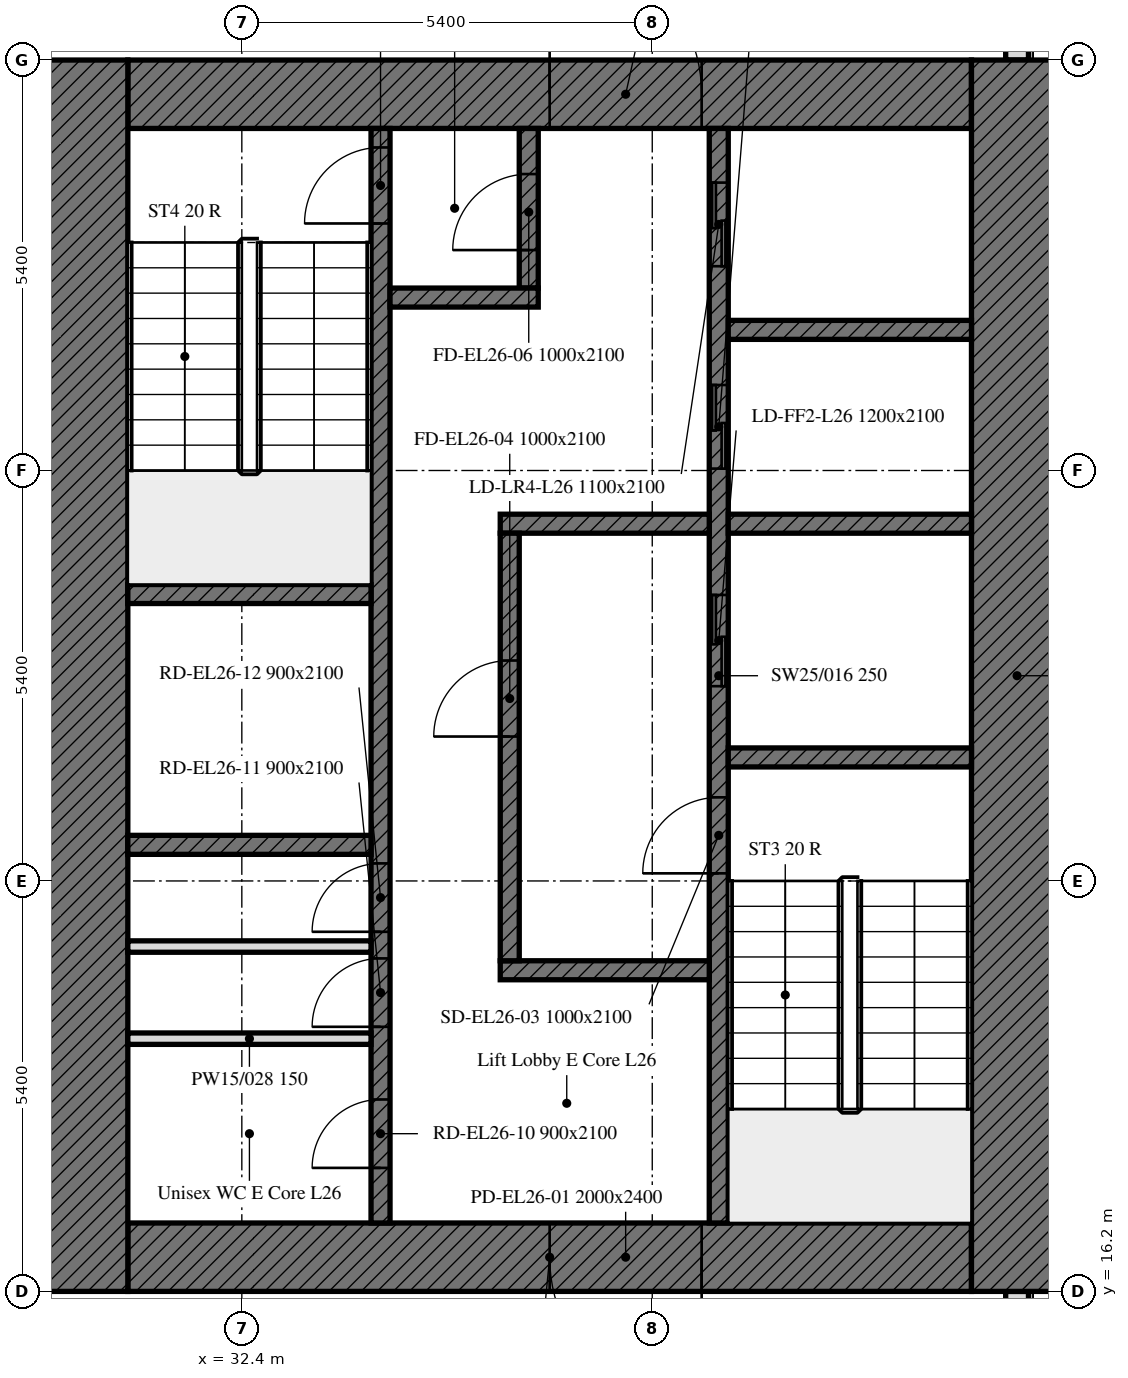
"""IFC4 building model, lengths in metres.
Left out: names, types, materials, properties, quantities, classifications, styles, units other than length and angle.
Written with IfcOpenShell. Run it as: python <this file> out.ifc"""

import sys

from ifc_helpers import new_model, si_unit, direction, frame, frame_2d, origin, place, context, subcontext, project, spatial, rectangle, extrude, element, fill, save


model = new_model("IFC4")
c1 = context("Model", 3, precision=1e-05, world=origin(), true_north=direction((0.0, 1.0)))
c2 = subcontext(c1, "Body", "Model", "MODEL_VIEW")
j1 = project(units=[si_unit("LENGTHUNIT", "METRE"), si_unit("PLANEANGLEUNIT", "RADIAN")], contexts=[c1])
p1 = place(None, origin())
s1 = spatial("IfcSite", under=j1, at=p1, CompositionType="ELEMENT")
p2 = place(p1, origin())
s2 = spatial("IfcBuilding", under=s1, at=p2, CompositionType="ELEMENT")
p3 = place(p2, frame((0.0, 0.0, 110.6)))
s3 = spatial("IfcBuildingStorey", under=s2, at=p3, CompositionType="ELEMENT", Elevation=110.6)
p4 = place(p3, frame((42.6, 10.986, 0.0), z_axis=(0.0, 0.0, 1.0), x_axis=(0.0, 1.0, 0.0)))
e1 = element("IfcWall", 1, at=p4, inside=s3, PredefinedType="SOLIDWALL", context=c2, shape_type="SweptSolid", body=[
    extrude(rectangle(XDim=5.214, YDim=0.3, at=frame_2d((2.607, 0.0))), origin(), (0.0, 0.0, 1.0), 3.5),
])
p5 = place(p4, frame((1.164, 0.0, 0.9)))
e2 = element("IfcOpeningElement", 2, at=p5, cuts=e1, PredefinedType="OPENING", context=c2, shape_type="SweptSolid", body=[
    extrude(rectangle(XDim=1.1, YDim=1.7, at=frame_2d((0.55, 0.85))), frame((0.0, 0.16, 0.0), z_axis=(0.0, -1.0, 0.0), x_axis=(1.0, 0.0, 0.0)), (0.0, 0.0, 1.0), 0.32),
])
p6 = place(p4, frame((2.764, 0.0, 0.9)))
e3 = element("IfcOpeningElement", 3, at=p6, cuts=e1, PredefinedType="OPENING", context=c2, shape_type="SweptSolid", body=[
    extrude(rectangle(XDim=1.1, YDim=1.7, at=frame_2d((0.55, 0.85))), frame((0.0, 0.16, 0.0), z_axis=(0.0, -1.0, 0.0), x_axis=(1.0, 0.0, 0.0)), (0.0, 0.0, 1.0), 0.32),
])
p7 = place(p3, frame((42.6, 32.4, 0.0), z_axis=(0.0, 0.0, 1.0), x_axis=(0.0, 1.0, 0.0)))
e4 = element("IfcWall", 4, at=p7, inside=s3, PredefinedType="SOLIDWALL", context=c2, shape_type="SweptSolid", body=[
    extrude(rectangle(XDim=10.614, YDim=0.3, at=frame_2d((5.307, 0.0))), origin(), (0.0, 0.0, 1.0), 3.5),
])
p8 = place(p7, frame((1.35, 0.0, 0.9)))
e5 = element("IfcOpeningElement", 5, at=p8, cuts=e4, PredefinedType="OPENING", context=c2, shape_type="SweptSolid", body=[
    extrude(rectangle(XDim=1.1, YDim=1.7, at=frame_2d((0.55, 0.85))), frame((0.0, 0.16, 0.0), z_axis=(0.0, -1.0, 0.0), x_axis=(1.0, 0.0, 0.0)), (0.0, 0.0, 1.0), 0.32),
])
p9 = place(p7, frame((2.95, 0.0, 0.9)))
e6 = element("IfcOpeningElement", 6, at=p9, cuts=e4, PredefinedType="OPENING", context=c2, shape_type="SweptSolid", body=[
    extrude(rectangle(XDim=1.1, YDim=1.7, at=frame_2d((0.55, 0.85))), frame((0.0, 0.16, 0.0), z_axis=(0.0, -1.0, 0.0), x_axis=(1.0, 0.0, 0.0)), (0.0, 0.0, 1.0), 0.32),
])
p10 = place(p3, frame((42.0, 16.65, 0.0), z_axis=(0.0, 0.0, 1.0), x_axis=(-1.0, 0.0, 0.0)))
e7 = element("IfcWall", 7, at=p10, inside=s3, PredefinedType="SOLIDWALL", context=c2, shape_type="SweptSolid", body=[
    extrude(rectangle(XDim=11.1, YDim=0.9, at=frame_2d((5.55, 0.0))), origin(), (0.0, 0.0, 1.0), 3.5),
])
p11 = place(p10, frame((3.55, 0.0, 0.0)))
e8 = element("IfcOpeningElement", 8, at=p11, cuts=e7, PredefinedType="OPENING", context=c2, shape_type="SweptSolid", body=[
    extrude(rectangle(XDim=2.0, YDim=2.4, at=frame_2d((1.0, 1.2))), frame((0.0, 0.45, 0.0), z_axis=(0.0, -1.0, 0.0), x_axis=(1.0, 0.0, 0.0)), (0.0, 0.0, 1.0), 0.9),
])
p12 = place(p3, frame((30.9, 31.95, 0.0), z_axis=(0.0, 0.0, 1.0), x_axis=(1.0, 0.0, 0.0)))
e9 = element("IfcWall", 9, at=p12, inside=s3, PredefinedType="SOLIDWALL", context=c2, shape_type="SweptSolid", body=[
    extrude(rectangle(XDim=11.1, YDim=0.9, at=frame_2d((5.55, 0.0))), origin(), (0.0, 0.0, 1.0), 3.5),
])
p13 = place(p12, frame((5.55, 0.0, 0.0)))
e10 = element("IfcOpeningElement", 10, at=p13, cuts=e9, PredefinedType="OPENING", context=c2, shape_type="SweptSolid", body=[
    extrude(rectangle(XDim=2.0, YDim=2.4, at=frame_2d((1.0, 1.2))), frame((0.0, 0.45, 0.0), z_axis=(0.0, -1.0, 0.0), x_axis=(1.0, 0.0, 0.0)), (0.0, 0.0, 1.0), 0.9),
])
for number, where, z_axis, x_axis in (
    (11, (42.6, 32.4, 0.0), (0.0, 0.0, 1.0), (0.0, -1.0, 0.0)),
    (12, (30.3, 16.2, 0.0), (0.0, 0.0, 1.0), (0.0, 1.0, 0.0)),
):
    element("IfcWall", number, at=place(p3, frame(where, z_axis=z_axis, x_axis=x_axis)), inside=s3, PredefinedType="SOLIDWALL", context=c2, shape_type="SweptSolid", body=[
        extrude(rectangle(XDim=16.2, YDim=1.2, at=frame_2d((8.1, 0.0))), origin(), (0.0, 0.0, 1.0), 3.5),
    ])
p14 = place(p3, frame((38.675, 17.1, 0.0), z_axis=(0.0, 0.0, 1.0), x_axis=(0.0, 1.0, 0.0)))
e13 = element("IfcWall", 13, at=p14, inside=s3, PredefinedType="SOLIDWALL", context=c2, shape_type="SweptSolid", body=[
    extrude(rectangle(XDim=14.4, YDim=0.25, at=frame_2d((7.2, 0.0))), origin(), (0.0, 0.0, 1.0), 3.5),
])
p15 = place(p14, frame((4.6, 0.0, 0.0)))
e14 = element("IfcOpeningElement", 14, at=p15, cuts=e13, PredefinedType="OPENING", context=c2, shape_type="SweptSolid", body=[
    extrude(rectangle(XDim=1.0, YDim=2.1, at=frame_2d((0.5, 1.05))), frame((0.0, 0.125, 0.0), z_axis=(0.0, -1.0, 0.0), x_axis=(1.0, 0.0, 0.0)), (0.0, 0.0, 1.0), 0.25),
])
p16 = place(p14, frame((7.062, 0.0, 0.0)))
e15 = element("IfcOpeningElement", 15, at=p16, cuts=e13, PredefinedType="OPENING", context=c2, shape_type="SweptSolid", body=[
    extrude(rectangle(XDim=1.2, YDim=2.1, at=frame_2d((0.6, 1.05))), frame((0.0, 0.125, 0.0), z_axis=(0.0, -1.0, 0.0), x_axis=(1.0, 0.0, 0.0)), (0.0, 0.0, 1.0), 0.25),
])
p17 = place(p14, frame((9.925, 0.0, 0.0)))
e16 = element("IfcOpeningElement", 16, at=p17, cuts=e13, PredefinedType="OPENING", context=c2, shape_type="SweptSolid", body=[
    extrude(rectangle(XDim=1.1, YDim=2.1, at=frame_2d((0.55, 1.05))), frame((0.0, 0.125, 0.0), z_axis=(0.0, -1.0, 0.0), x_axis=(1.0, 0.0, 0.0)), (0.0, 0.0, 1.0), 0.25),
])
p18 = place(p14, frame((12.587, 0.0, 0.0)))
e17 = element("IfcOpeningElement", 17, at=p18, cuts=e13, PredefinedType="OPENING", context=c2, shape_type="SweptSolid", body=[
    extrude(rectangle(XDim=1.1, YDim=2.1, at=frame_2d((0.55, 1.05))), frame((0.0, 0.125, 0.0), z_axis=(0.0, -1.0, 0.0), x_axis=(1.0, 0.0, 0.0)), (0.0, 0.0, 1.0), 0.25),
])
p19 = place(p3, frame((34.225, 17.1, 0.0), z_axis=(0.0, 0.0, 1.0), x_axis=(0.0, 1.0, 0.0)))
e18 = element("IfcWall", 18, at=p19, inside=s3, PredefinedType="SOLIDWALL", context=c2, shape_type="SweptSolid", body=[
    extrude(rectangle(XDim=14.4, YDim=0.25, at=frame_2d((7.2, 0.0))), origin(), (0.0, 0.0, 1.0), 3.5),
])
p20 = place(p19, frame((13.15, 0.0, 0.0)))
e19 = element("IfcOpeningElement", 19, at=p20, cuts=e18, PredefinedType="OPENING", context=c2, shape_type="SweptSolid", body=[
    extrude(rectangle(XDim=1.0, YDim=2.1, at=frame_2d((0.5, 1.05))), frame((0.0, 0.125, 0.0), z_axis=(0.0, -1.0, 0.0), x_axis=(1.0, 0.0, 0.0)), (0.0, 0.0, 1.0), 0.25),
])
p21 = place(p19, frame((0.725, 0.0, 0.0)))
e20 = element("IfcOpeningElement", 20, at=p21, cuts=e18, PredefinedType="OPENING", context=c2, shape_type="SweptSolid", body=[
    extrude(rectangle(XDim=0.9, YDim=2.1, at=frame_2d((0.45, 1.05))), frame((0.0, 0.125, 0.0), z_axis=(0.0, -1.0, 0.0), x_axis=(1.0, 0.0, 0.0)), (0.0, 0.0, 1.0), 0.25),
])
p22 = place(p19, frame((2.581, 0.0, 0.0)))
e21 = element("IfcOpeningElement", 21, at=p22, cuts=e18, PredefinedType="OPENING", context=c2, shape_type="SweptSolid", body=[
    extrude(rectangle(XDim=0.9, YDim=2.1, at=frame_2d((0.45, 1.05))), frame((0.0, 0.125, 0.0), z_axis=(0.0, -1.0, 0.0), x_axis=(1.0, 0.0, 0.0)), (0.0, 0.0, 1.0), 0.25),
])
p23 = place(p19, frame((3.831, 0.0, 0.0)))
e22 = element("IfcOpeningElement", 22, at=p23, cuts=e18, PredefinedType="OPENING", context=c2, shape_type="SweptSolid", body=[
    extrude(rectangle(XDim=0.9, YDim=2.1, at=frame_2d((0.45, 1.05))), frame((0.0, 0.125, 0.0), z_axis=(0.0, -1.0, 0.0), x_axis=(1.0, 0.0, 0.0)), (0.0, 0.0, 1.0), 0.25),
])
p24 = place(p3, frame((38.8, 23.225, 0.0), z_axis=(0.0, 0.0, 1.0), x_axis=(1.0, 0.0, 0.0)))
e23 = element("IfcWall", 23, at=p24, inside=s3, PredefinedType="SOLIDWALL", context=c2, shape_type="SweptSolid", body=[
    extrude(rectangle(XDim=3.2, YDim=0.25, at=frame_2d((1.6, 0.0))), origin(), (0.0, 0.0, 1.0), 3.5),
])
for number, where, z_axis, x_axis in (
    (24, (30.9, 25.375, 0.0), (0.0, 0.0, 1.0), (1.0, 0.0, 0.0)),
    (25, (30.9, 22.075, 0.0), (0.0, 0.0, 1.0), (1.0, 0.0, 0.0)),
):
    element("IfcWall", number, at=place(p3, frame(where, z_axis=z_axis, x_axis=x_axis)), inside=s3, PredefinedType="SOLIDWALL", context=c2, shape_type="SweptSolid", body=[
        extrude(rectangle(XDim=3.2, YDim=0.25, at=frame_2d((1.6, 0.0))), origin(), (0.0, 0.0, 1.0), 3.5),
    ])
p25 = place(p3, frame((38.8, 26.3, 0.0), z_axis=(0.0, 0.0, 1.0), x_axis=(1.0, 0.0, 0.0)))
e26 = element("IfcWall", 26, at=p25, inside=s3, PredefinedType="SOLIDWALL", context=c2, shape_type="SweptSolid", body=[
    extrude(rectangle(XDim=3.2, YDim=0.25, at=frame_2d((1.6, 0.0))), origin(), (0.0, 0.0, 1.0), 3.5),
])
for number, where, z_axis, x_axis in (
    (27, (35.8, 26.3, 0.0), (0.0, 0.0, 1.0), (1.0, 0.0, 0.0)),
    (28, (35.8, 20.425, 0.0), (0.0, 0.0, 1.0), (1.0, 0.0, 0.0)),
):
    element("IfcWall", number, at=place(p3, frame(where, z_axis=z_axis, x_axis=x_axis)), inside=s3, PredefinedType="SOLIDWALL", context=c2, shape_type="SweptSolid", body=[
        extrude(rectangle(XDim=2.75, YDim=0.25, at=frame_2d((1.375, 0.0))), origin(), (0.0, 0.0, 1.0), 3.5),
    ])
p26 = place(p3, frame((36.175, 29.4, 0.0), z_axis=(0.0, 0.0, 1.0), x_axis=(0.0, 1.0, 0.0)))
e29 = element("IfcWall", 29, at=p26, inside=s3, PredefinedType="SOLIDWALL", context=c2, shape_type="SweptSolid", body=[
    extrude(rectangle(XDim=2.1, YDim=0.25, at=frame_2d((1.05, 0.0))), origin(), (0.0, 0.0, 1.0), 3.5),
])
p27 = place(p26, frame((0.5, 0.0, 0.0)))
e30 = element("IfcOpeningElement", 30, at=p27, cuts=e29, PredefinedType="OPENING", context=c2, shape_type="SweptSolid", body=[
    extrude(rectangle(XDim=1.0, YDim=2.1, at=frame_2d((0.5, 1.05))), frame((0.0, 0.125, 0.0), z_axis=(0.0, -1.0, 0.0), x_axis=(1.0, 0.0, 0.0)), (0.0, 0.0, 1.0), 0.25),
])
p28 = place(p3, frame((34.35, 29.275, 0.0), z_axis=(0.0, 0.0, 1.0), x_axis=(1.0, 0.0, 0.0)))
e31 = element("IfcWall", 31, at=p28, inside=s3, PredefinedType="SOLIDWALL", context=c2, shape_type="SweptSolid", body=[
    extrude(rectangle(XDim=1.95, YDim=0.25, at=frame_2d((0.975, 0.0))), origin(), (0.0, 0.0, 1.0), 3.5),
])
p29 = place(p3, frame((35.925, 20.55, 0.0), z_axis=(0.0, 0.0, 1.0), x_axis=(0.0, 1.0, 0.0)))
e32 = element("IfcWall", 32, at=p29, inside=s3, PredefinedType="SOLIDWALL", context=c2, shape_type="SweptSolid", body=[
    extrude(rectangle(XDim=5.625, YDim=0.25, at=frame_2d((2.812, 0.0))), origin(), (0.0, 0.0, 1.0), 3.5),
])
p30 = place(p29, frame((2.95, 0.0, 0.0)))
e33 = element("IfcOpeningElement", 33, at=p30, cuts=e32, PredefinedType="OPENING", context=c2, shape_type="SweptSolid", body=[
    extrude(rectangle(XDim=1.0, YDim=2.1, at=frame_2d((0.5, 1.05))), frame((0.0, 0.125, 0.0), z_axis=(0.0, -1.0, 0.0), x_axis=(1.0, 0.0, 0.0)), (0.0, 0.0, 1.0), 0.25),
])
p31 = place(p3, frame((38.8, 28.85, 0.0), z_axis=(0.0, 0.0, 1.0), x_axis=(1.0, 0.0, 0.0)))
e34 = element("IfcWall", 34, at=p31, inside=s3, PredefinedType="SOLIDWALL", context=c2, shape_type="SweptSolid", body=[
    extrude(rectangle(XDim=3.2, YDim=0.25, at=frame_2d((1.6, 0.0))), origin(), (0.0, 0.0, 1.0), 3.5),
])
for number, where, z_axis, x_axis in (
    (35, (30.9, 19.525, 0.0), (0.0, 0.0, 1.0), (1.0, 0.0, 0.0)),
    (36, (30.9, 20.737, 0.0), (0.0, 0.0, 1.0), (1.0, 0.0, 0.0)),
):
    element("IfcWall", number, at=place(p3, frame(where, z_axis=z_axis, x_axis=x_axis)), inside=s3, PredefinedType="PARTITIONING", context=c2, shape_type="SweptSolid", body=[
        extrude(rectangle(XDim=3.2, YDim=0.15, at=frame_2d((1.6, 0.0))), origin(), (0.0, 0.0, 1.0), 3.5),
    ])
p32 = place(p11, origin())
e37 = element("IfcDoor", 37, at=p32, inside=s3, OperationType="DOUBLE_DOOR_SINGLE_SWING", PredefinedType="DOOR", context=c2, shape_type="SweptSolid", body=[
    extrude(rectangle(XDim=2.0, YDim=2.4, at=frame_2d((1.0, 1.2))), frame((0.0, 0.025, 0.0), z_axis=(0.0, -1.0, 0.0), x_axis=(1.0, 0.0, 0.0)), (0.0, 0.0, 1.0), 0.05),
])
fill(e8, e37)
p33 = place(p13, origin())
e38 = element("IfcDoor", 38, at=p33, inside=s3, OperationType="DOUBLE_DOOR_SINGLE_SWING", PredefinedType="DOOR", context=c2, shape_type="SweptSolid", body=[
    extrude(rectangle(XDim=2.0, YDim=2.4, at=frame_2d((1.0, 1.2))), frame((0.0, 0.025, 0.0), z_axis=(0.0, -1.0, 0.0), x_axis=(1.0, 0.0, 0.0)), (0.0, 0.0, 1.0), 0.05),
])
fill(e10, e38)
p34 = place(p15, origin())
e39 = element("IfcDoor", 39, at=p34, inside=s3, OperationType="SINGLE_SWING_LEFT", PredefinedType="DOOR", context=c2, shape_type="SweptSolid", body=[
    extrude(rectangle(XDim=1.0, YDim=2.1, at=frame_2d((0.5, 1.05))), frame((0.0, 0.025, 0.0), z_axis=(0.0, -1.0, 0.0), x_axis=(1.0, 0.0, 0.0)), (0.0, 0.0, 1.0), 0.05),
])
fill(e14, e39)
p35 = place(p30, origin())
e40 = element("IfcDoor", 40, at=p35, inside=s3, OperationType="SINGLE_SWING_LEFT", PredefinedType="DOOR", context=c2, shape_type="SweptSolid", body=[
    extrude(rectangle(XDim=1.0, YDim=2.1, at=frame_2d((0.5, 1.05))), frame((0.0, 0.025, 0.0), z_axis=(0.0, -1.0, 0.0), x_axis=(1.0, 0.0, 0.0)), (0.0, 0.0, 1.0), 0.05),
])
fill(e33, e40)
p36 = place(p20, origin())
e41 = element("IfcDoor", 41, at=p36, inside=s3, OperationType="SINGLE_SWING_LEFT", PredefinedType="DOOR", context=c2, shape_type="SweptSolid", body=[
    extrude(rectangle(XDim=1.0, YDim=2.1, at=frame_2d((0.5, 1.05))), frame((0.0, 0.025, 0.0), z_axis=(0.0, -1.0, 0.0), x_axis=(1.0, 0.0, 0.0)), (0.0, 0.0, 1.0), 0.05),
])
fill(e19, e41)
p37 = place(p27, origin())
e42 = element("IfcDoor", 42, at=p37, inside=s3, OperationType="SINGLE_SWING_LEFT", PredefinedType="DOOR", context=c2, shape_type="SweptSolid", body=[
    extrude(rectangle(XDim=1.0, YDim=2.1, at=frame_2d((0.5, 1.05))), frame((0.0, 0.025, 0.0), z_axis=(0.0, -1.0, 0.0), x_axis=(1.0, 0.0, 0.0)), (0.0, 0.0, 1.0), 0.05),
])
fill(e30, e42)
p38 = place(p16, origin())
e43 = element("IfcDoor", 43, at=p38, inside=s3, OperationType="DOUBLE_DOOR_SLIDING", PredefinedType="DOOR", context=c2, shape_type="SweptSolid", body=[
    extrude(rectangle(XDim=1.2, YDim=2.1, at=frame_2d((0.6, 1.05))), frame((0.0, 0.025, 0.0), z_axis=(0.0, -1.0, 0.0), x_axis=(1.0, 0.0, 0.0)), (0.0, 0.0, 1.0), 0.05),
])
fill(e15, e43)
p39 = place(p17, origin())
e44 = element("IfcDoor", 44, at=p39, inside=s3, OperationType="DOUBLE_DOOR_SLIDING", PredefinedType="DOOR", context=c2, shape_type="SweptSolid", body=[
    extrude(rectangle(XDim=1.1, YDim=2.1, at=frame_2d((0.55, 1.05))), frame((0.0, 0.025, 0.0), z_axis=(0.0, -1.0, 0.0), x_axis=(1.0, 0.0, 0.0)), (0.0, 0.0, 1.0), 0.05),
])
fill(e16, e44)
p40 = place(p18, origin())
e45 = element("IfcDoor", 45, at=p40, inside=s3, OperationType="DOUBLE_DOOR_SLIDING", PredefinedType="DOOR", context=c2, shape_type="SweptSolid", body=[
    extrude(rectangle(XDim=1.1, YDim=2.1, at=frame_2d((0.55, 1.05))), frame((0.0, 0.025, 0.0), z_axis=(0.0, -1.0, 0.0), x_axis=(1.0, 0.0, 0.0)), (0.0, 0.0, 1.0), 0.05),
])
fill(e17, e45)
p41 = place(p21, origin())
e46 = element("IfcDoor", 46, at=p41, inside=s3, OperationType="SINGLE_SWING_LEFT", PredefinedType="DOOR", context=c2, shape_type="SweptSolid", body=[
    extrude(rectangle(XDim=0.9, YDim=2.1, at=frame_2d((0.45, 1.05))), frame((0.0, 0.025, 0.0), z_axis=(0.0, -1.0, 0.0), x_axis=(1.0, 0.0, 0.0)), (0.0, 0.0, 1.0), 0.05),
])
fill(e20, e46)
p42 = place(p22, origin())
e47 = element("IfcDoor", 47, at=p42, inside=s3, OperationType="SINGLE_SWING_LEFT", PredefinedType="DOOR", context=c2, shape_type="SweptSolid", body=[
    extrude(rectangle(XDim=0.9, YDim=2.1, at=frame_2d((0.45, 1.05))), frame((0.0, 0.025, 0.0), z_axis=(0.0, -1.0, 0.0), x_axis=(1.0, 0.0, 0.0)), (0.0, 0.0, 1.0), 0.05),
])
fill(e21, e47)
p43 = place(p23, origin())
e48 = element("IfcDoor", 48, at=p43, inside=s3, OperationType="SINGLE_SWING_LEFT", PredefinedType="DOOR", context=c2, shape_type="SweptSolid", body=[
    extrude(rectangle(XDim=0.9, YDim=2.1, at=frame_2d((0.45, 1.05))), frame((0.0, 0.025, 0.0), z_axis=(0.0, -1.0, 0.0), x_axis=(1.0, 0.0, 0.0)), (0.0, 0.0, 1.0), 0.05),
])
fill(e22, e48)
save(model, sys.argv[1])
